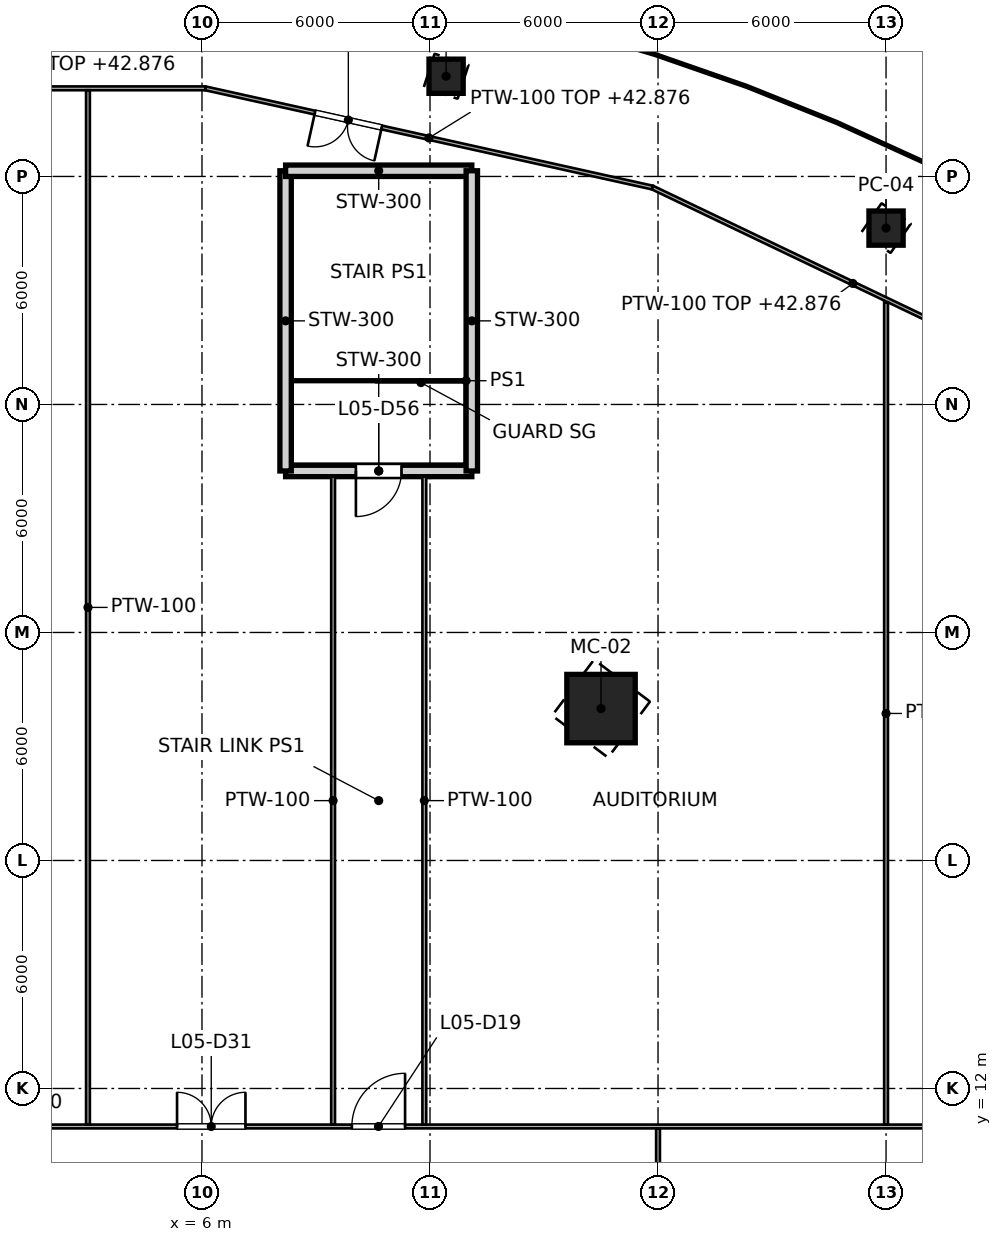
"""IFC4 building model, lengths in metres.
Left out: names, types, materials, properties, quantities, classifications, styles, units other than length and angle.
Written with IfcOpenShell. Run it as: python <this file> out.ifc"""

import sys

from ifc_helpers import new_model, si_unit, direction, frame, frame_2d, origin, origin_2d, place, context, subcontext, project, spatial, rectangle, hollow_rectangle, extrude, element, fill, save


model = new_model("IFC4")
c1 = context("Model", 3, precision=1e-05, world=origin(), true_north=direction((0.0, 1.0)))
c2 = subcontext(c1, "Body", "Model", "MODEL_VIEW")
j1 = project(units=[si_unit("LENGTHUNIT", "METRE"), si_unit("PLANEANGLEUNIT", "RADIAN")], contexts=[c1])
p1 = place(None, origin())
s1 = spatial("IfcSite", under=j1, at=p1, CompositionType="ELEMENT")
p2 = place(p1, origin())
s2 = spatial("IfcBuilding", under=s1, at=p2, CompositionType="ELEMENT")
p3 = place(p2, frame((0.0, 0.0, 37.4)))
s3 = spatial("IfcBuildingStorey", under=s2, at=p3, CompositionType="ELEMENT", Elevation=37.4)
p4 = place(p3, frame((16.5, 21.997, 0.0), z_axis=(0.0, 0.0, 1.0), x_axis=(0.600051693363, 0.799961227368, 0.0)))
e1 = element("IfcColumn", 1, at=p4, inside=s3, PredefinedType="COLUMN", context=c2, shape_type="SweptSolid", body=[
    extrude(hollow_rectangle(XDim=1.8, YDim=1.8, WallThickness=0.08, at=origin_2d()), origin(), (0.0, 0.0, 1.0), 5.9),
])
for number, where, z_axis, x_axis in (
    (2, (24.0, 34.641, 0.0), (0.0, 0.0, 1.0), (0.569, 0.822, 0.0)),
    (3, (12.423, 38.637, 0.0), (0.0, 0.0, 1.0), (0.306, 0.952, 0.0)),
):
    element("IfcColumn", number, at=place(p3, frame(where, z_axis=z_axis, x_axis=x_axis)), inside=s3, PredefinedType="COLUMN", context=c2, shape_type="SweptSolid", body=[
        extrude(hollow_rectangle(XDim=0.9, YDim=0.9, WallThickness=0.04, at=origin_2d()), origin(), (0.0, 0.0, 1.0), 6.6),
    ])
p5 = place(p3, frame((13.1, 28.25, 0.0), z_axis=(0.0, 0.0, 1.0), x_axis=(-1.0, 0.0, 0.0)))
e4 = element("IfcWall", 4, at=p5, inside=s3, PredefinedType="SOLIDWALL", context=c2, shape_type="SweptSolid", body=[
    extrude(rectangle(XDim=4.9, YDim=0.3, at=frame_2d((2.45, 0.0))), origin(), (0.0, 0.0, 1.0), 6.25),
])
p6 = place(p5, frame((1.85, 0.0, 0.0)))
e5 = element("IfcOpeningElement", 5, at=p6, cuts=e4, PredefinedType="OPENING", context=c2, shape_type="SweptSolid", body=[
    extrude(rectangle(XDim=1.2, YDim=2.1, at=frame_2d((0.6, 1.05))), frame((0.0, 0.15, 0.0), z_axis=(0.0, -1.0, 0.0), x_axis=(1.0, 0.0, 0.0)), (0.0, 0.0, 1.0), 0.3),
])
p7 = place(p3, frame((8.2, 28.25, 0.0), z_axis=(0.0, 0.0, 1.0), x_axis=(0.0, 1.0, 0.0)))
e6 = element("IfcWall", 6, at=p7, inside=s3, PredefinedType="SOLIDWALL", context=c2, shape_type="SweptSolid", body=[
    extrude(rectangle(XDim=7.9, YDim=0.3, at=frame_2d((3.95, 0.0))), origin(), (0.0, 0.0, 1.0), 6.25),
])
p8 = place(p3, frame((8.2, 36.15, 0.0), z_axis=(0.0, 0.0, 1.0), x_axis=(1.0, 0.0, 0.0)))
e7 = element("IfcWall", 7, at=p8, inside=s3, PredefinedType="SOLIDWALL", context=c2, shape_type="SweptSolid", body=[
    extrude(rectangle(XDim=4.9, YDim=0.3, at=frame_2d((2.45, 0.0))), origin(), (0.0, 0.0, 1.0), 6.25),
])
p9 = place(p3, frame((13.1, 36.15, 0.0), z_axis=(0.0, 0.0, 1.0), x_axis=(0.0, -1.0, 0.0)))
e8 = element("IfcWall", 8, at=p9, inside=s3, PredefinedType="SOLIDWALL", context=c2, shape_type="SweptSolid", body=[
    extrude(rectangle(XDim=7.9, YDim=0.3, at=frame_2d((3.95, 0.0))), origin(), (0.0, 0.0, 1.0), 6.25),
])
p10 = place(p3, frame((28.399, 30.663, 0.0), z_axis=(0.0, 0.0, 1.0), x_axis=(-0.902100999032, 0.431524955878, 0.0)))
e9 = element("IfcWall", 9, at=p10, inside=s3, PredefinedType="PARTITIONING", context=c2, shape_type="SweptSolid", body=[
    extrude(rectangle(XDim=11.691, YDim=0.1, at=frame_2d((5.845, 0.0))), origin(), (0.0, 0.0, 1.0), 5.476),
])
p11 = place(p3, frame((17.852, 35.708, 0.0), z_axis=(0.0, 0.0, 1.0), x_axis=(-0.97623471049, 0.216715920124, 0.0)))
e10 = element("IfcWall", 10, at=p11, inside=s3, PredefinedType="PARTITIONING", context=c2, shape_type="SweptSolid", body=[
    extrude(rectangle(XDim=12.05, YDim=0.1, at=frame_2d((6.025, 0.0))), origin(), (0.0, 0.0, 1.0), 5.476),
])
p12 = place(p11, frame((7.296, 0.0, 0.0)))
e11 = element("IfcOpeningElement", 11, at=p12, cuts=e10, PredefinedType="OPENING", context=c2, shape_type="SweptSolid", body=[
    extrude(rectangle(XDim=1.8, YDim=2.1, at=frame_2d((0.9, 1.05))), frame((0.0, 0.05, 0.0), z_axis=(0.0, -1.0, 0.0), x_axis=(1.0, 0.0, 0.0)), (0.0, 0.0, 1.0), 0.1),
])
p13 = place(p3, frame((6.089, 38.319, 0.0), z_axis=(0.0, 0.0, 1.0), x_axis=(-1.0, 0.0, 0.0)))
e12 = element("IfcWall", 12, at=p13, inside=s3, PredefinedType="PARTITIONING", context=c2, shape_type="SweptSolid", body=[
    extrude(rectangle(XDim=12.178, YDim=0.1, at=frame_2d((6.089, 0.0))), origin(), (0.0, 0.0, 1.0), 5.476),
])
p14 = place(p13, frame((7.15, 0.0, 0.0)))
e13 = element("IfcOpeningElement", 13, at=p14, cuts=e12, PredefinedType="OPENING", context=c2, shape_type="SweptSolid", body=[
    extrude(rectangle(XDim=0.9, YDim=2.1, at=frame_2d((0.45, 1.05))), frame((0.0, 0.05, 0.0), z_axis=(0.0, -1.0, 0.0), x_axis=(1.0, 0.0, 0.0)), (0.0, 0.0, 1.0), 0.1),
])
p15 = place(p3, frame((-44.256, 11.0, 0.0), z_axis=(0.0, 0.0, 1.0), x_axis=(1.0, 0.0, 0.0)))
e14 = element("IfcWall", 14, at=p15, inside=s3, PredefinedType="PARTITIONING", context=c2, shape_type="SweptSolid", body=[
    extrude(rectangle(XDim=88.512, YDim=0.1, at=frame_2d((44.256, 0.0))), origin(), (0.0, 0.0, 1.0), 5.318),
])
p16 = place(p15, frame((54.2, 0.0, 0.0)))
e15 = element("IfcOpeningElement", 15, at=p16, cuts=e14, PredefinedType="OPENING", context=c2, shape_type="SweptSolid", body=[
    extrude(rectangle(XDim=1.4, YDim=2.1, at=frame_2d((0.7, 1.05))), frame((0.0, 0.05, 0.0), z_axis=(0.0, -1.0, 0.0), x_axis=(1.0, 0.0, 0.0)), (0.0, 0.0, 1.0), 0.1),
])
p17 = place(p15, frame((32.9, 0.0, 0.0)))
e16 = element("IfcOpeningElement", 16, at=p17, cuts=e14, PredefinedType="OPENING", context=c2, shape_type="SweptSolid", body=[
    extrude(rectangle(XDim=1.4, YDim=2.1, at=frame_2d((0.7, 1.05))), frame((0.0, 0.05, 0.0), z_axis=(0.0, -1.0, 0.0), x_axis=(1.0, 0.0, 0.0)), (0.0, 0.0, 1.0), 0.1),
])
p18 = place(p15, frame((28.95, 0.0, 0.0)))
e17 = element("IfcOpeningElement", 17, at=p18, cuts=e14, PredefinedType="OPENING", context=c2, shape_type="SweptSolid", body=[
    extrude(rectangle(XDim=1.8, YDim=2.1, at=frame_2d((0.9, 1.05))), frame((0.0, 0.05, 0.0), z_axis=(0.0, -1.0, 0.0), x_axis=(1.0, 0.0, 0.0)), (0.0, 0.0, 1.0), 0.1),
])
p19 = place(p15, frame((42.35, 0.0, 0.0)))
e18 = element("IfcOpeningElement", 18, at=p19, cuts=e14, PredefinedType="OPENING", context=c2, shape_type="SweptSolid", body=[
    extrude(rectangle(XDim=0.9, YDim=2.1, at=frame_2d((0.45, 1.05))), frame((0.0, 0.05, 0.0), z_axis=(0.0, -1.0, 0.0), x_axis=(1.0, 0.0, 0.0)), (0.0, 0.0, 1.0), 0.1),
])
p20 = place(p15, frame((49.6, 0.0, 0.0)))
e19 = element("IfcOpeningElement", 19, at=p20, cuts=e14, PredefinedType="OPENING", context=c2, shape_type="SweptSolid", body=[
    extrude(rectangle(XDim=1.8, YDim=2.1, at=frame_2d((0.9, 1.05))), frame((0.0, 0.05, 0.0), z_axis=(0.0, -1.0, 0.0), x_axis=(1.0, 0.0, 0.0)), (0.0, 0.0, 1.0), 0.1),
])
p21 = place(p3, frame((18.0, -10.95, 0.0), z_axis=(0.0, 0.0, 1.0), x_axis=(0.0, 1.0, 0.0)))
e20 = element("IfcWall", 20, at=p21, inside=s3, PredefinedType="PARTITIONING", context=c2, shape_type="SweptSolid", body=[
    extrude(rectangle(XDim=21.9, YDim=0.1, at=frame_2d((10.95, 0.0))), origin(), (0.0, 0.0, 1.0), 5.318),
])
p22 = place(p21, frame((10.25, 0.0, 0.0)))
e21 = element("IfcOpeningElement", 21, at=p22, cuts=e20, PredefinedType="OPENING", context=c2, shape_type="SweptSolid", body=[
    extrude(rectangle(XDim=1.4, YDim=2.1, at=frame_2d((0.7, 1.05))), frame((0.0, 0.05, 0.0), z_axis=(0.0, -1.0, 0.0), x_axis=(1.0, 0.0, 0.0)), (0.0, 0.0, 1.0), 0.1),
])
p23 = place(p21, frame((3.6, 0.0, 0.0)))
e22 = element("IfcOpeningElement", 22, at=p23, cuts=e20, PredefinedType="OPENING", context=c2, shape_type="SweptSolid", body=[
    extrude(rectangle(XDim=1.8, YDim=2.1, at=frame_2d((0.9, 1.05))), frame((0.0, 0.05, 0.0), z_axis=(0.0, -1.0, 0.0), x_axis=(1.0, 0.0, 0.0)), (0.0, 0.0, 1.0), 0.1),
])
p24 = place(p21, frame((16.95, 0.0, 0.0)))
e23 = element("IfcOpeningElement", 23, at=p24, cuts=e20, PredefinedType="OPENING", context=c2, shape_type="SweptSolid", body=[
    extrude(rectangle(XDim=0.9, YDim=2.1, at=frame_2d((0.45, 1.05))), frame((0.0, 0.05, 0.0), z_axis=(0.0, -1.0, 0.0), x_axis=(1.0, 0.0, 0.0)), (0.0, 0.0, 1.0), 0.1),
])
p25 = place(p3, frame((3.0, 11.05, 0.0), z_axis=(0.0, 0.0, 1.0), x_axis=(0.0, 1.0, 0.0)))
e24 = element("IfcWall", 24, at=p25, inside=s3, PredefinedType="PARTITIONING", context=c2, shape_type="SweptSolid", body=[
    extrude(rectangle(XDim=27.219, YDim=0.1, at=frame_2d((13.61, 0.0))), origin(), (0.0, 0.0, 1.0), 5.318),
])
p26 = place(p3, frame((24.0, 11.05, 0.0), z_axis=(0.0, 0.0, 1.0), x_axis=(0.0, 1.0, 0.0)))
e25 = element("IfcWall", 25, at=p26, inside=s3, PredefinedType="PARTITIONING", context=c2, shape_type="SweptSolid", body=[
    extrude(rectangle(XDim=21.638, YDim=0.1, at=frame_2d((10.819, 0.0))), origin(), (0.0, 0.0, 1.0), 5.395),
])
for number, where, z_axis, x_axis in (
    (26, (9.45, 11.05, 0.0), (0.0, 0.0, 1.0), (0.0, 1.0, 0.0)),
    (27, (11.85, 11.05, 0.0), (0.0, 0.0, 1.0), (0.0, 1.0, 0.0)),
):
    element("IfcWall", number, at=place(p3, frame(where, z_axis=z_axis, x_axis=x_axis)), inside=s3, PredefinedType="PARTITIONING", context=c2, shape_type="SweptSolid", body=[
        extrude(rectangle(XDim=17.05, YDim=0.1, at=frame_2d((8.525, 0.0))), origin(), (0.0, 0.0, 1.0), 5.318),
    ])
p27 = place(p16, origin())
e28 = element("IfcDoor", 28, at=p27, inside=s3, OperationType="SINGLE_SWING_RIGHT", PredefinedType="DOOR", context=c2, shape_type="SweptSolid", body=[
    extrude(rectangle(XDim=1.4, YDim=2.1, at=frame_2d((0.7, 1.05))), frame((0.0, 0.025, 0.0), z_axis=(0.0, -1.0, 0.0), x_axis=(1.0, 0.0, 0.0)), (0.0, 0.0, 1.0), 0.05),
])
fill(e15, e28)
p28 = place(p20, origin())
e29 = element("IfcDoor", 29, at=p28, inside=s3, OperationType="DOUBLE_DOOR_SINGLE_SWING", PredefinedType="DOOR", context=c2, shape_type="SweptSolid", body=[
    extrude(rectangle(XDim=1.8, YDim=2.1, at=frame_2d((0.9, 1.05))), frame((0.0, 0.025, 0.0), z_axis=(0.0, -1.0, 0.0), x_axis=(1.0, 0.0, 0.0)), (0.0, 0.0, 1.0), 0.05),
])
fill(e19, e29)
p29 = place(p12, origin())
e30 = element("IfcDoor", 30, at=p29, inside=s3, OperationType="DOUBLE_DOOR_SINGLE_SWING", PredefinedType="DOOR", context=c2, shape_type="SweptSolid", body=[
    extrude(rectangle(XDim=1.8, YDim=2.1, at=frame_2d((0.9, 1.05))), frame((0.0, 0.025, 0.0), z_axis=(0.0, -1.0, 0.0), x_axis=(1.0, 0.0, 0.0)), (0.0, 0.0, 1.0), 0.05),
])
fill(e11, e30)
p30 = place(p6, origin())
e31 = element("IfcDoor", 31, at=p30, inside=s3, OperationType="SINGLE_SWING_RIGHT", PredefinedType="DOOR", context=c2, shape_type="SweptSolid", body=[
    extrude(rectangle(XDim=1.2, YDim=2.1, at=frame_2d((0.6, 1.05))), frame((0.0, 0.025, 0.0), z_axis=(0.0, -1.0, 0.0), x_axis=(1.0, 0.0, 0.0)), (0.0, 0.0, 1.0), 0.05),
])
fill(e5, e31)
save(model, sys.argv[1])
